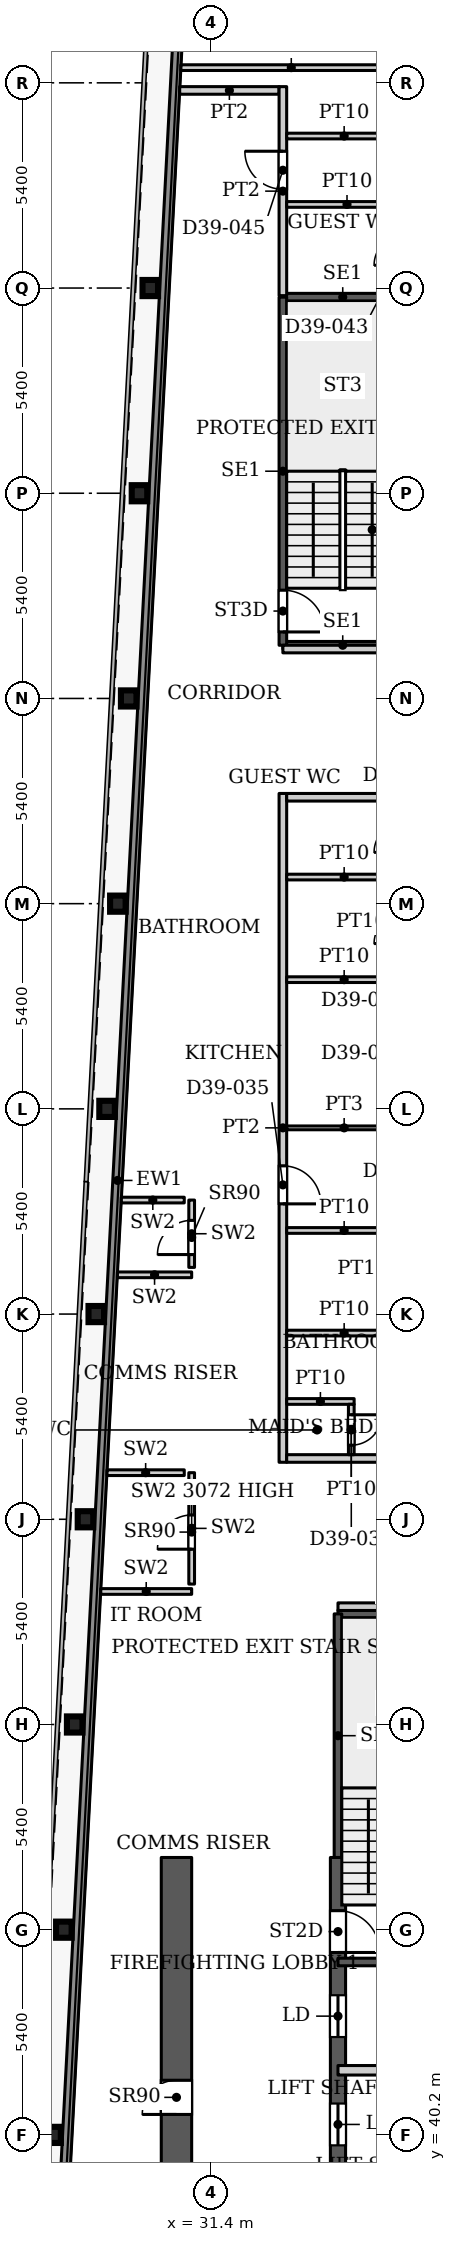
"""IFC4 building model, lengths in metres.
Left out: names, types, materials, properties, quantities, classifications, styles, units other than length and angle.
Written with IfcOpenShell. Run it as: python <this file> out.ifc"""

import sys

from ifc_helpers import new_model, si_unit, direction, frame, frame_2d, origin, origin_2d, place, context, subcontext, project, spatial, rectangle, i_section, extrude, source, transform, mapped, element, fill, save


model = new_model("IFC4")
c1 = context("Model", 3, precision=1e-05, world=origin(), true_north=direction((0.0, 1.0)))
c2 = subcontext(c1, "Body", "Model", "MODEL_VIEW")
j1 = project(units=[si_unit("LENGTHUNIT", "METRE"), si_unit("PLANEANGLEUNIT", "RADIAN")], contexts=[c1])
p1 = place(None, origin())
s1 = spatial("IfcSite", under=j1, at=p1, CompositionType="ELEMENT")
p2 = place(p1, origin())
s2 = spatial("IfcBuilding", under=s1, at=p2, CompositionType="ELEMENT")
p3 = place(p2, frame((0.0, 0.0, 168.2)))
s3 = spatial("IfcBuildingStorey", under=s2, at=p3, CompositionType="ELEMENT", Elevation=168.2)
for number, where, z_axis, x_axis in (
    (1, (27.253, 40.2, 0.0), (0.0, 0.0, 1.0), (1.0, 0.0, 0.0)),
    (2, (27.537, 45.6, 0.0), (0.0, 0.0, 1.0), (1.0, 0.0, 0.0)),
    (3, (27.822, 51.0, 0.0), (0.0, 0.0, 1.0), (1.0, 0.0, 0.0)),
    (4, (28.106, 56.4, 0.0), (0.0, 0.0, 1.0), (1.0, 0.0, 0.0)),
    (5, (28.39, 61.8, 0.0), (0.0, 0.0, 1.0), (1.0, 0.0, 0.0)),
    (6, (28.674, 67.2, 0.0), (0.0, 0.0, 1.0), (1.0, 0.0, 0.0)),
    (7, (28.958, 72.6, 0.0), (0.0, 0.0, 1.0), (1.0, 0.0, 0.0)),
    (8, (29.243, 78.0, 0.0), (0.0, 0.0, 1.0), (1.0, 0.0, 0.0)),
    (9, (29.527, 83.4, 0.0), (0.0, 0.0, 1.0), (1.0, 0.0, 0.0)),
    (10, (29.811, 88.8, 0.0), (0.0, 0.0, 1.0), (1.0, 0.0, 0.0)),
):
    element("IfcColumn", number, at=place(p3, frame(where, z_axis=z_axis, x_axis=x_axis)), inside=s3, PredefinedType="COLUMN", context=c2, shape_type="SweptSolid", body=[
        extrude(i_section(OverallWidth=0.409, OverallDepth=0.425, WebThickness=0.033, FlangeThickness=0.052, FilletRadius=0.013, at=origin_2d()), origin(), (0.0, 0.0, 1.0), 3.9),
    ])
p4 = place(p3, frame((34.75, 29.05, 0.0), z_axis=(0.0, 0.0, 1.0), x_axis=(0.0, 1.0, 0.0)))
e11 = element("IfcWall", 11, at=p4, inside=s3, PredefinedType="SHEAR", context=c2, shape_type="SweptSolid", body=[
    extrude(rectangle(XDim=18.45, YDim=0.4, at=frame_2d((9.225, 0.0))), origin(), (0.0, 0.0, 1.0), 3.9),
])
p5 = place(p4, frame((8.025, 0.0, 0.0)))
e12 = element("IfcOpeningElement", 12, at=p5, cuts=e11, PredefinedType="OPENING", context=c2, shape_type="SweptSolid", body=[
    extrude(rectangle(XDim=1.1, YDim=2.2, at=frame_2d((0.55, 1.1))), frame((0.0, 0.21, 0.0), z_axis=(0.0, -1.0, 0.0), x_axis=(1.0, 0.0, 0.0)), (0.0, 0.0, 1.0), 0.42),
])
p6 = place(p4, frame((10.875, 0.0, 0.0)))
e13 = element("IfcOpeningElement", 13, at=p6, cuts=e11, PredefinedType="OPENING", context=c2, shape_type="SweptSolid", body=[
    extrude(rectangle(XDim=1.1, YDim=2.2, at=frame_2d((0.55, 1.1))), frame((0.0, 0.21, 0.0), z_axis=(0.0, -1.0, 0.0), x_axis=(1.0, 0.0, 0.0)), (0.0, 0.0, 1.0), 0.42),
])
p7 = place(p4, frame((13.725, 0.0, 0.0)))
e14 = element("IfcOpeningElement", 14, at=p7, cuts=e11, PredefinedType="OPENING", context=c2, shape_type="SweptSolid", body=[
    extrude(rectangle(XDim=1.1, YDim=2.2, at=frame_2d((0.55, 1.1))), frame((0.0, 0.21, 0.0), z_axis=(0.0, -1.0, 0.0), x_axis=(1.0, 0.0, 0.0)), (0.0, 0.0, 1.0), 0.42),
])
p8 = place(p4, frame((15.95, 0.0, 0.0)))
e15 = element("IfcOpeningElement", 15, at=p8, cuts=e11, PredefinedType="OPENING", context=c2, shape_type="SweptSolid", body=[
    extrude(rectangle(XDim=1.1, YDim=2.2, at=frame_2d((0.55, 1.1))), frame((0.0, 0.21, 0.0), z_axis=(0.0, -1.0, 0.0), x_axis=(1.0, 0.0, 0.0)), (0.0, 0.0, 1.0), 0.42),
])
p9 = place(p3, frame((30.5, 29.05, 0.0), z_axis=(0.0, 0.0, 1.0), x_axis=(0.0, 1.0, 0.0)))
e16 = element("IfcWall", 16, at=p9, inside=s3, PredefinedType="SHEAR", context=c2, shape_type="SweptSolid", body=[
    extrude(rectangle(XDim=18.45, YDim=0.8, at=frame_2d((9.225, 0.0))), origin(), (0.0, 0.0, 1.0), 3.9),
])
p10 = place(p9, frame((1.5, 0.0, 0.0)))
e17 = element("IfcOpeningElement", 17, at=p10, cuts=e16, PredefinedType="OPENING", context=c2, shape_type="SweptSolid", body=[
    extrude(rectangle(XDim=0.9, YDim=2.2, at=frame_2d((0.45, 1.1))), frame((0.0, 0.41, 0.0), z_axis=(0.0, -1.0, 0.0), x_axis=(1.0, 0.0, 0.0)), (0.0, 0.0, 1.0), 0.82),
])
p11 = place(p9, frame((7.406, 0.0, 0.0)))
e18 = element("IfcOpeningElement", 18, at=p11, cuts=e16, PredefinedType="OPENING", context=c2, shape_type="SweptSolid", body=[
    extrude(rectangle(XDim=0.9, YDim=2.2, at=frame_2d((0.45, 1.1))), frame((0.0, 0.41, 0.0), z_axis=(0.0, -1.0, 0.0), x_axis=(1.0, 0.0, 0.0)), (0.0, 0.0, 1.0), 0.82),
])
p12 = place(p9, frame((11.688, 0.0, 0.0)))
e19 = element("IfcOpeningElement", 19, at=p12, cuts=e16, PredefinedType="OPENING", context=c2, shape_type="SweptSolid", body=[
    extrude(rectangle(XDim=0.9, YDim=2.2, at=frame_2d((0.45, 1.1))), frame((0.0, 0.41, 0.0), z_axis=(0.0, -1.0, 0.0), x_axis=(1.0, 0.0, 0.0)), (0.0, 0.0, 1.0), 0.82),
])
p13 = place(p3, frame((27.195, 31.969, 0.0), z_axis=(0.0, 0.0, 1.0), x_axis=(0.052554995867, 0.998618031286, 0.0)))
e20 = element("IfcWall", 20, at=p13, inside=s3, PredefinedType="SOLIDWALL", context=c2, shape_type="SweptSolid", body=[
    extrude(rectangle(XDim=66.787, YDim=0.25, at=frame_2d((33.394, 0.0))), origin(), (0.0, 0.0, 1.0), 3.75),
])
for number, where, z_axis, x_axis in (
    (21, (34.75, 44.75, 0.0), (0.0, 0.0, 1.0), (1.0, 0.0, 0.0)),
    (22, (34.75, 53.91, 0.0), (0.0, 0.0, 1.0), (1.0, 0.0, 0.0)),
):
    element("IfcWall", number, at=place(p3, frame(where, z_axis=z_axis, x_axis=x_axis)), inside=s3, PredefinedType="SHEAR", context=c2, shape_type="SweptSolid", body=[
        extrude(rectangle(XDim=3.15, YDim=0.2, at=frame_2d((1.575, 0.0))), origin(), (0.0, 0.0, 1.0), 3.9),
    ])
p14 = place(p3, frame((34.75, 47.5, 0.0), z_axis=(0.0, 0.0, 1.0), x_axis=(0.0, 1.0, 0.0)))
e23 = element("IfcWall", 23, at=p14, inside=s3, PredefinedType="SHEAR", context=c2, shape_type="SweptSolid", body=[
    extrude(rectangle(XDim=6.41, YDim=0.2, at=frame_2d((3.205, 0.0))), origin(), (0.0, 0.0, 1.0), 3.9),
])
for number, where, z_axis, x_axis in (
    (24, (33.3, 79.4, 0.0), (0.0, 0.0, 1.0), (1.0, 0.0, 0.0)),
    (25, (33.3, 88.56, 0.0), (0.0, 0.0, 1.0), (1.0, 0.0, 0.0)),
):
    element("IfcWall", number, at=place(p3, frame(where, z_axis=z_axis, x_axis=x_axis)), inside=s3, PredefinedType="SHEAR", context=c2, shape_type="SweptSolid", body=[
        extrude(rectangle(XDim=3.15, YDim=0.2, at=frame_2d((1.575, 0.0))), origin(), (0.0, 0.0, 1.0), 3.9),
    ])
p15 = place(p3, frame((33.3, 79.4, 0.0), z_axis=(0.0, 0.0, 1.0), x_axis=(0.0, 1.0, 0.0)))
e26 = element("IfcWall", 26, at=p15, inside=s3, PredefinedType="SHEAR", context=c2, shape_type="SweptSolid", body=[
    extrude(rectangle(XDim=9.16, YDim=0.2, at=frame_2d((4.58, 0.0))), origin(), (0.0, 0.0, 1.0), 3.9),
])
p16 = place(p15, frame((0.35, 0.0, 0.0)))
e27 = element("IfcOpeningElement", 27, at=p16, cuts=e26, PredefinedType="OPENING", context=c2, shape_type="SweptSolid", body=[
    extrude(rectangle(XDim=1.1, YDim=2.2, at=frame_2d((0.55, 1.1))), frame((0.0, 0.11, 0.0), z_axis=(0.0, -1.0, 0.0), x_axis=(1.0, 0.0, 0.0)), (0.0, 0.0, 1.0), 0.22),
])
p17 = place(p3, frame((34.75, 41.9, 0.0), z_axis=(0.0, 0.0, 1.0), x_axis=(1.0, 0.0, 0.0)))
e28 = element("IfcWall", 28, at=p17, inside=s3, PredefinedType="PARTITIONING", context=c2, shape_type="SweptSolid", body=[
    extrude(rectangle(XDim=3.25, YDim=0.25, at=frame_2d((1.625, 0.0))), origin(), (0.0, 0.0, 1.0), 3.9),
])
p18 = place(p3, frame((28.508, 54.5, 0.0), z_axis=(0.0, 0.0, 1.0), x_axis=(1.0, 0.0, 0.0)))
e29 = element("IfcWall", 29, at=p18, inside=s3, PredefinedType="PARTITIONING", context=c2, shape_type="SweptSolid", body=[
    extrude(rectangle(XDim=2.392, YDim=0.15, at=frame_2d((1.196, 0.0))), origin(), (0.0, 0.0, 1.0), 3.9),
])
p19 = place(p3, frame((30.9, 54.695, 0.0), z_axis=(0.0, 0.0, 1.0), x_axis=(0.0, 1.0, 0.0)))
e30 = element("IfcWall", 30, at=p19, inside=s3, PredefinedType="PARTITIONING", context=c2, shape_type="SweptSolid", body=[
    extrude(rectangle(XDim=2.931, YDim=0.15, at=frame_2d((1.465, 0.0))), origin(), (0.0, 0.0, 1.0), 3.072),
])
p20 = place(p19, frame((0.918, 0.0, 0.0)))
e31 = element("IfcOpeningElement", 31, at=p20, cuts=e30, PredefinedType="OPENING", context=c2, shape_type="SweptSolid", body=[
    extrude(rectangle(XDim=0.9, YDim=2.2, at=frame_2d((0.45, 1.1))), frame((0.0, 0.085, 0.0), z_axis=(0.0, -1.0, 0.0), x_axis=(1.0, 0.0, 0.0)), (0.0, 0.0, 1.0), 0.17),
])
p21 = place(p3, frame((28.673, 57.626, 0.0), z_axis=(0.0, 0.0, 1.0), x_axis=(1.0, 0.0, 0.0)))
e32 = element("IfcWall", 32, at=p21, inside=s3, PredefinedType="PARTITIONING", context=c2, shape_type="SweptSolid", body=[
    extrude(rectangle(XDim=2.032, YDim=0.15, at=frame_2d((1.016, 0.0))), origin(), (0.0, 0.0, 1.0), 3.9),
])
p22 = place(p3, frame((28.947, 62.833, 0.0), z_axis=(0.0, 0.0, 1.0), x_axis=(1.0, 0.0, 0.0)))
e33 = element("IfcWall", 33, at=p22, inside=s3, PredefinedType="PARTITIONING", context=c2, shape_type="SweptSolid", body=[
    extrude(rectangle(XDim=1.953, YDim=0.15, at=frame_2d((0.977, 0.0))), origin(), (0.0, 0.0, 1.0), 3.9),
])
p23 = place(p3, frame((30.9, 63.028, 0.0), z_axis=(0.0, 0.0, 1.0), x_axis=(0.0, 1.0, 0.0)))
e34 = element("IfcWall", 34, at=p23, inside=s3, PredefinedType="PARTITIONING", context=c2, shape_type="SweptSolid", body=[
    extrude(rectangle(XDim=1.772, YDim=0.15, at=frame_2d((0.886, 0.0))), origin(), (0.0, 0.0, 1.0), 3.9),
])
p24 = place(p23, frame((0.338, 0.0, 0.0)))
e35 = element("IfcOpeningElement", 35, at=p24, cuts=e34, PredefinedType="OPENING", context=c2, shape_type="SweptSolid", body=[
    extrude(rectangle(XDim=0.9, YDim=2.2, at=frame_2d((0.45, 1.1))), frame((0.0, 0.085, 0.0), z_axis=(0.0, -1.0, 0.0), x_axis=(1.0, 0.0, 0.0)), (0.0, 0.0, 1.0), 0.17),
])
p25 = place(p3, frame((29.05, 64.8, 0.0), z_axis=(0.0, 0.0, 1.0), x_axis=(1.0, 0.0, 0.0)))
e36 = element("IfcWall", 36, at=p25, inside=s3, PredefinedType="PARTITIONING", context=c2, shape_type="SweptSolid", body=[
    extrude(rectangle(XDim=1.655, YDim=0.15, at=frame_2d((0.828, 0.0))), origin(), (0.0, 0.0, 1.0), 3.9),
])
p26 = place(p3, frame((30.617, 94.6, 0.0), z_axis=(0.0, 0.0, 1.0), x_axis=(1.0, 0.0, 0.0)))
e37 = element("IfcWall", 37, at=p26, inside=s3, PredefinedType="PARTITIONING", context=c2, shape_type="SweptSolid", body=[
    extrude(rectangle(XDim=5.808, YDim=0.15, at=frame_2d((2.904, 0.0))), origin(), (0.0, 0.0, 1.0), 3.6),
])
p27 = place(p3, frame((30.585, 94.0, 0.0), z_axis=(0.0, 0.0, 1.0), x_axis=(1.0, 0.0, 0.0)))
e38 = element("IfcWall", 38, at=p27, inside=s3, PredefinedType="PARTITIONING", context=c2, shape_type="SweptSolid", body=[
    extrude(rectangle(XDim=2.615, YDim=0.2, at=frame_2d((1.308, 0.0))), origin(), (0.0, 0.0, 1.0), 3.6),
])
p28 = place(p3, frame((33.3, 57.9, 0.0), z_axis=(0.0, 0.0, 1.0), x_axis=(0.0, 1.0, 0.0)))
e39 = element("IfcWall", 39, at=p28, inside=s3, PredefinedType="PARTITIONING", context=c2, shape_type="SweptSolid", body=[
    extrude(rectangle(XDim=17.6, YDim=0.2, at=frame_2d((8.8, 0.0))), origin(), (0.0, 0.0, 1.0), 3.6),
])
p29 = place(p28, frame((6.8, 0.0, 0.0)))
e40 = element("IfcOpeningElement", 40, at=p29, cuts=e39, PredefinedType="OPENING", context=c2, shape_type="SweptSolid", body=[
    extrude(rectangle(XDim=1.0, YDim=2.1, at=frame_2d((0.5, 1.05))), frame((0.0, 0.11, 0.0), z_axis=(0.0, -1.0, 0.0), x_axis=(1.0, 0.0, 0.0)), (0.0, 0.0, 1.0), 0.22),
])
p30 = place(p3, frame((33.3, 79.3, 0.0), z_axis=(0.0, 0.0, 1.0), x_axis=(1.0, 0.0, 0.0)))
e41 = element("IfcWall", 41, at=p30, inside=s3, PredefinedType="PARTITIONING", context=c2, shape_type="SweptSolid", body=[
    extrude(rectangle(XDim=12.6, YDim=0.2, at=frame_2d((6.3, 0.0))), origin(), (0.0, 0.0, 1.0), 3.6),
])
p31 = place(p30, frame((5.795, 0.0, 0.0)))
e42 = element("IfcOpeningElement", 42, at=p31, cuts=e41, PredefinedType="OPENING", context=c2, shape_type="SweptSolid", body=[
    extrude(rectangle(XDim=1.0, YDim=2.1, at=frame_2d((0.5, 1.05))), frame((0.0, 0.11, 0.0), z_axis=(0.0, -1.0, 0.0), x_axis=(1.0, 0.0, 0.0)), (0.0, 0.0, 1.0), 0.22),
])
p32 = place(p3, frame((33.3, 88.6, 0.0), z_axis=(0.0, 0.0, 1.0), x_axis=(0.0, 1.0, 0.0)))
e43 = element("IfcWall", 43, at=p32, inside=s3, PredefinedType="PARTITIONING", context=c2, shape_type="SweptSolid", body=[
    extrude(rectangle(XDim=5.5, YDim=0.2, at=frame_2d((2.75, 0.0))), origin(), (0.0, 0.0, 1.0), 3.6),
])
p33 = place(p32, frame((2.8, 0.0, 0.0)))
e44 = element("IfcOpeningElement", 44, at=p33, cuts=e43, PredefinedType="OPENING", context=c2, shape_type="SweptSolid", body=[
    extrude(rectangle(XDim=1.0, YDim=2.1, at=frame_2d((0.5, 1.05))), frame((0.0, 0.11, 0.0), z_axis=(0.0, -1.0, 0.0), x_axis=(1.0, 0.0, 0.0)), (0.0, 0.0, 1.0), 0.22),
])
p34 = place(p3, frame((33.4, 58.0, 0.0), z_axis=(0.0, 0.0, 1.0), x_axis=(1.0, 0.0, 0.0)))
e45 = element("IfcWall", 45, at=p34, inside=s3, PredefinedType="PARTITIONING", context=c2, shape_type="SweptSolid", body=[
    extrude(rectangle(XDim=12.5, YDim=0.2, at=frame_2d((6.25, 0.0))), origin(), (0.0, 0.0, 1.0), 3.6),
])
p35 = place(p3, frame((33.4, 59.5, 0.0), z_axis=(0.0, 0.0, 1.0), x_axis=(1.0, 0.0, 0.0)))
e46 = element("IfcWall", 46, at=p35, inside=s3, PredefinedType="PARTITIONING", context=c2, shape_type="SweptSolid", body=[
    extrude(rectangle(XDim=1.775, YDim=0.15, at=frame_2d((0.888, 0.0))), origin(), (0.0, 0.0, 1.0), 3.6),
])
for number, where, z_axis, x_axis in (
    (47, (33.4, 61.3, 0.0), (0.0, 0.0, 1.0), (1.0, 0.0, 0.0)),
    (48, (33.4, 64.0, 0.0), (0.0, 0.0, 1.0), (1.0, 0.0, 0.0)),
):
    element("IfcWall", number, at=place(p3, frame(where, z_axis=z_axis, x_axis=x_axis)), inside=s3, PredefinedType="PARTITIONING", context=c2, shape_type="SweptSolid", body=[
        extrude(rectangle(XDim=3.025, YDim=0.15, at=frame_2d((1.513, 0.0))), origin(), (0.0, 0.0, 1.0), 3.6),
    ])
p36 = place(p3, frame((33.4, 66.7, 0.0), z_axis=(0.0, 0.0, 1.0), x_axis=(1.0, 0.0, 0.0)))
e49 = element("IfcWall", 49, at=p36, inside=s3, PredefinedType="PARTITIONING", context=c2, shape_type="SweptSolid", body=[
    extrude(rectangle(XDim=3.025, YDim=0.1, at=frame_2d((1.513, 0.0))), origin(), (0.0, 0.0, 1.0), 3.6),
])
for number, where, z_axis, x_axis in (
    (50, (33.4, 70.6, 0.0), (0.0, 0.0, 1.0), (1.0, 0.0, 0.0)),
    (51, (33.4, 73.3, 0.0), (0.0, 0.0, 1.0), (1.0, 0.0, 0.0)),
):
    element("IfcWall", number, at=place(p3, frame(where, z_axis=z_axis, x_axis=x_axis)), inside=s3, PredefinedType="PARTITIONING", context=c2, shape_type="SweptSolid", body=[
        extrude(rectangle(XDim=3.025, YDim=0.15, at=frame_2d((1.513, 0.0))), origin(), (0.0, 0.0, 1.0), 3.6),
    ])
p37 = place(p3, frame((33.4, 75.4, 0.0), z_axis=(0.0, 0.0, 1.0), x_axis=(1.0, 0.0, 0.0)))
e52 = element("IfcWall", 52, at=p37, inside=s3, PredefinedType="PARTITIONING", context=c2, shape_type="SweptSolid", body=[
    extrude(rectangle(XDim=12.5, YDim=0.2, at=frame_2d((6.25, 0.0))), origin(), (0.0, 0.0, 1.0), 3.6),
])
p38 = place(p3, frame((33.4, 91.0, 0.0), z_axis=(0.0, 0.0, 1.0), x_axis=(1.0, 0.0, 0.0)))
e53 = element("IfcWall", 53, at=p38, inside=s3, PredefinedType="PARTITIONING", context=c2, shape_type="SweptSolid", body=[
    extrude(rectangle(XDim=3.175, YDim=0.15, at=frame_2d((1.587, 0.0))), origin(), (0.0, 0.0, 1.0), 3.6),
])
p39 = place(p3, frame((33.4, 92.8, 0.0), z_axis=(0.0, 0.0, 1.0), x_axis=(1.0, 0.0, 0.0)))
e54 = element("IfcWall", 54, at=p39, inside=s3, PredefinedType="PARTITIONING", context=c2, shape_type="SweptSolid", body=[
    extrude(rectangle(XDim=3.025, YDim=0.15, at=frame_2d((1.513, 0.0))), origin(), (0.0, 0.0, 1.0), 3.6),
])
p40 = place(p3, frame((34.75, 54.1, 0.0), z_axis=(0.0, 0.0, 1.0), x_axis=(1.0, 0.0, 0.0)))
e55 = element("IfcWall", 55, at=p40, inside=s3, PredefinedType="PARTITIONING", context=c2, shape_type="SweptSolid", body=[
    extrude(rectangle(XDim=11.15, YDim=0.2, at=frame_2d((5.575, 0.0))), origin(), (0.0, 0.0, 1.0), 3.6),
])
p41 = place(p40, frame((5.075, 0.0, 0.0)))
e56 = element("IfcOpeningElement", 56, at=p41, cuts=e55, PredefinedType="OPENING", context=c2, shape_type="SweptSolid", body=[
    extrude(rectangle(XDim=1.0, YDim=2.1, at=frame_2d((0.5, 1.05))), frame((0.0, 0.11, 0.0), z_axis=(0.0, -1.0, 0.0), x_axis=(1.0, 0.0, 0.0)), (0.0, 0.0, 1.0), 0.22),
])
p42 = place(p3, frame((35.1, 58.1, 0.0), z_axis=(0.0, 0.0, 1.0), x_axis=(0.0, 1.0, 0.0)))
e57 = element("IfcWall", 57, at=p42, inside=s3, PredefinedType="PARTITIONING", context=c2, shape_type="SweptSolid", body=[
    extrude(rectangle(XDim=1.325, YDim=0.15, at=frame_2d((0.663, 0.0))), origin(), (0.0, 0.0, 1.0), 3.6),
])
p43 = place(p42, frame((0.25, 0.0, 0.0)))
e58 = element("IfcOpeningElement", 58, at=p43, cuts=e57, PredefinedType="OPENING", context=c2, shape_type="SweptSolid", body=[
    extrude(rectangle(XDim=0.8, YDim=2.1, at=frame_2d((0.4, 1.05))), frame((0.0, 0.085, 0.0), z_axis=(0.0, -1.0, 0.0), x_axis=(1.0, 0.0, 0.0)), (0.0, 0.0, 1.0), 0.17),
])
m1 = source(origin(), c2, "Body", "SweptSolid", [
    extrude(rectangle(XDim=1.1, YDim=2.2, at=frame_2d((0.55, 1.1))), frame((0.0, 0.025, 0.0), z_axis=(0.0, -1.0, 0.0), x_axis=(1.0, 0.0, 0.0)), (0.0, 0.0, 1.0), 0.05),
])
p44 = place(p6, origin())
e59 = element("IfcDoor", 59, at=p44, inside=s3, OperationType="SLIDING_TO_LEFT", PredefinedType="DOOR", context=c2, shape_type="MappedRepresentation", body=[
    mapped(m1, transform((0.0, 0.0, 0.0), x_axis=(1.0, 0.0, 0.0), y_axis=(0.0, 1.0, 0.0), z_axis=(0.0, 0.0, 1.0), scale=1.0)),
])
fill(e13, e59)
p45 = place(p7, origin())
e60 = element("IfcDoor", 60, at=p45, inside=s3, OperationType="SLIDING_TO_LEFT", PredefinedType="DOOR", context=c2, shape_type="MappedRepresentation", body=[
    mapped(m1, transform((0.0, 0.0, 0.0), x_axis=(1.0, 0.0, 0.0), y_axis=(0.0, 1.0, 0.0), z_axis=(0.0, 0.0, 1.0), scale=1.0)),
])
fill(e14, e60)
m2 = source(origin(), c2, "Body", "SweptSolid", [
    extrude(rectangle(XDim=0.9, YDim=2.2, at=frame_2d((0.45, 1.1))), frame((0.0, 0.025, 0.0), z_axis=(0.0, -1.0, 0.0), x_axis=(1.0, 0.0, 0.0)), (0.0, 0.0, 1.0), 0.05),
])
p46 = place(p12, origin())
e61 = element("IfcDoor", 61, at=p46, inside=s3, OperationType="SINGLE_SWING_LEFT", PredefinedType="DOOR", context=c2, shape_type="MappedRepresentation", body=[
    mapped(m2, transform((0.0, 0.0, 0.0), x_axis=(1.0, 0.0, 0.0), y_axis=(0.0, 1.0, 0.0), z_axis=(0.0, 0.0, 1.0), scale=1.0)),
])
fill(e19, e61)
p47 = place(p20, origin())
e62 = element("IfcDoor", 62, at=p47, inside=s3, OperationType="SINGLE_SWING_LEFT", PredefinedType="DOOR", context=c2, shape_type="MappedRepresentation", body=[
    mapped(m2, transform((0.0, 0.0, 0.0), x_axis=(1.0, 0.0, 0.0), y_axis=(0.0, 1.0, 0.0), z_axis=(0.0, 0.0, 1.0), scale=1.0)),
])
fill(e31, e62)
p48 = place(p24, origin())
e63 = element("IfcDoor", 63, at=p48, inside=s3, OperationType="SINGLE_SWING_LEFT", PredefinedType="DOOR", context=c2, shape_type="MappedRepresentation", body=[
    mapped(m2, transform((0.0, 0.0, 0.0), x_axis=(1.0, 0.0, 0.0), y_axis=(0.0, 1.0, 0.0), z_axis=(0.0, 0.0, 1.0), scale=1.0)),
])
fill(e35, e63)
m3 = source(origin(), c2, "Body", "SweptSolid", [
    extrude(rectangle(XDim=1.1, YDim=2.2, at=frame_2d((0.55, 1.1))), frame((0.0, 0.025, 0.0), z_axis=(0.0, -1.0, 0.0), x_axis=(1.0, 0.0, 0.0)), (0.0, 0.0, 1.0), 0.05),
])
p49 = place(p8, origin())
e64 = element("IfcDoor", 64, at=p49, inside=s3, OperationType="SINGLE_SWING_RIGHT", PredefinedType="DOOR", context=c2, shape_type="MappedRepresentation", body=[
    mapped(m3, transform((0.0, 0.0, 0.0), x_axis=(1.0, 0.0, 0.0), y_axis=(0.0, 1.0, 0.0), z_axis=(0.0, 0.0, 1.0), scale=1.0)),
])
fill(e15, e64)
p50 = place(p16, origin())
e65 = element("IfcDoor", 65, at=p50, inside=s3, OperationType="SINGLE_SWING_RIGHT", PredefinedType="DOOR", context=c2, shape_type="MappedRepresentation", body=[
    mapped(m3, transform((0.0, 0.0, 0.0), x_axis=(1.0, 0.0, 0.0), y_axis=(0.0, 1.0, 0.0), z_axis=(0.0, 0.0, 1.0), scale=1.0)),
])
fill(e27, e65)
m4 = source(origin(), c2, "Body", "SweptSolid", [
    extrude(rectangle(XDim=1.0, YDim=2.1, at=frame_2d((0.5, 1.05))), frame((0.0, 0.025, 0.0), z_axis=(0.0, -1.0, 0.0), x_axis=(1.0, 0.0, 0.0)), (0.0, 0.0, 1.0), 0.05),
])
p51 = place(p29, origin())
e66 = element("IfcDoor", 66, at=p51, inside=s3, OperationType="SINGLE_SWING_RIGHT", PredefinedType="DOOR", context=c2, shape_type="MappedRepresentation", body=[
    mapped(m4, transform((0.0, 0.0, 0.0), x_axis=(1.0, 0.0, 0.0), y_axis=(0.0, 1.0, 0.0), z_axis=(0.0, 0.0, 1.0), scale=1.0)),
])
fill(e40, e66)
m5 = source(origin(), c2, "Body", "SweptSolid", [
    extrude(rectangle(XDim=0.8, YDim=2.1, at=frame_2d((0.4, 1.05))), frame((0.0, 0.025, 0.0), z_axis=(0.0, -1.0, 0.0), x_axis=(1.0, 0.0, 0.0)), (0.0, 0.0, 1.0), 0.05),
])
p52 = place(p43, origin())
e67 = element("IfcDoor", 67, at=p52, inside=s3, OperationType="SINGLE_SWING_RIGHT", PredefinedType="DOOR", context=c2, shape_type="MappedRepresentation", body=[
    mapped(m5, transform((0.0, 0.0, 0.0), x_axis=(1.0, 0.0, 0.0), y_axis=(0.0, 1.0, 0.0), z_axis=(0.0, 0.0, 1.0), scale=1.0)),
])
fill(e58, e67)
p53 = place(p33, origin())
e68 = element("IfcDoor", 68, at=p53, inside=s3, OperationType="SINGLE_SWING_LEFT", PredefinedType="DOOR", context=c2, shape_type="MappedRepresentation", body=[
    mapped(m4, transform((0.0, 0.0, 0.0), x_axis=(1.0, 0.0, 0.0), y_axis=(0.0, 1.0, 0.0), z_axis=(0.0, 0.0, 1.0), scale=1.0)),
])
fill(e44, e68)
save(model, sys.argv[1])
